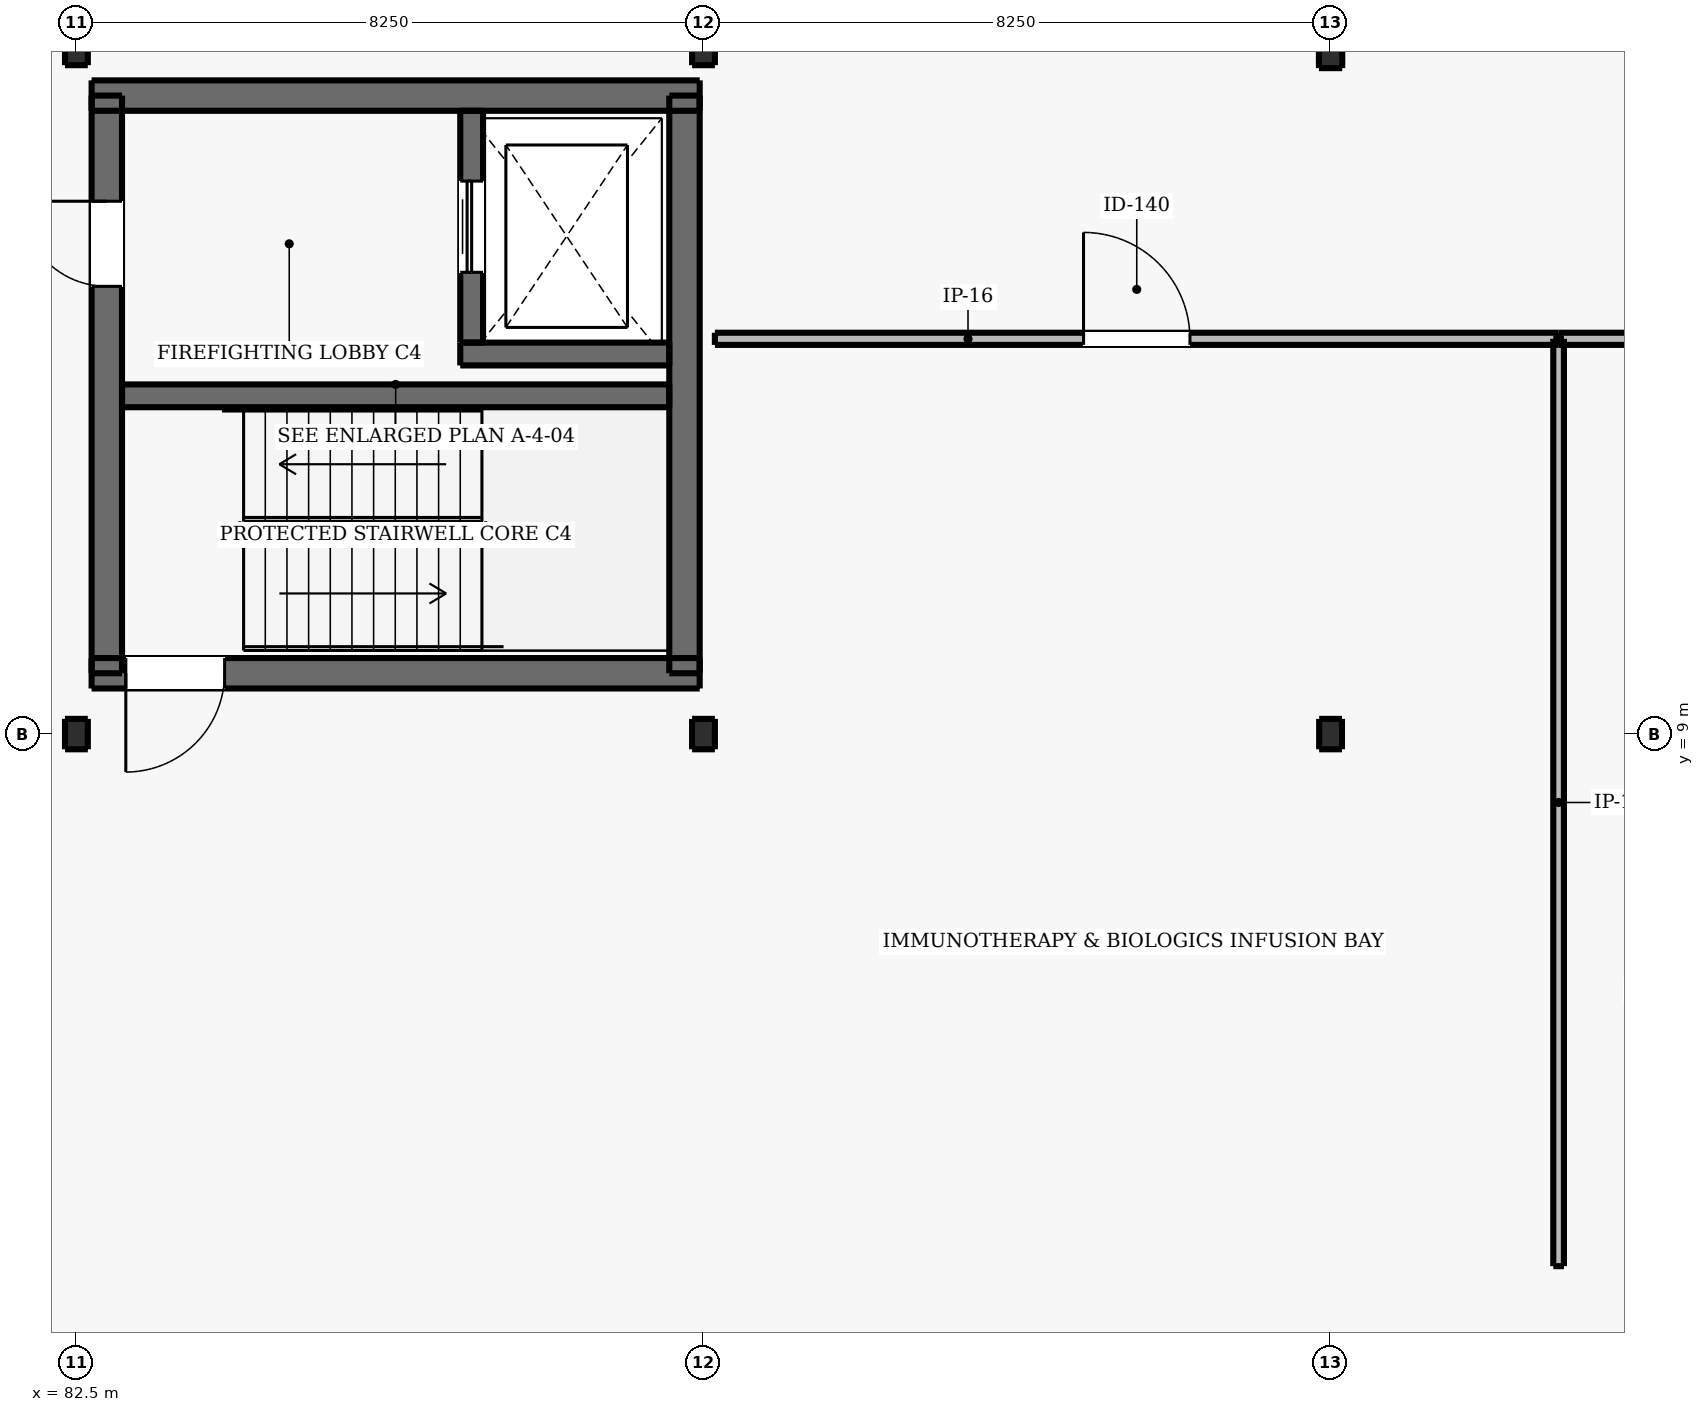
"""IFC4 building model, lengths in metres.
Left out: names, types, materials, properties, quantities, classifications, styles, units other than length and angle.
Written with IfcOpenShell. Run it as: python <this file> out.ifc"""

import sys

from ifc_helpers import new_model, si_unit, direction, frame, frame_2d, origin, origin_2d, place, context, subcontext, project, spatial, rectangle, i_section, extrude, element, fill, save


model = new_model("IFC4")
c1 = context("Model", 3, precision=1e-05, world=origin(), true_north=direction((0.0, 1.0)))
c2 = subcontext(c1, "Body", "Model", "MODEL_VIEW")
j1 = project(units=[si_unit("LENGTHUNIT", "METRE"), si_unit("PLANEANGLEUNIT", "RADIAN")], contexts=[c1])
p1 = place(None, origin())
s1 = spatial("IfcSite", under=j1, at=p1, CompositionType="ELEMENT")
p2 = place(p1, origin())
s2 = spatial("IfcBuilding", under=s1, at=p2, CompositionType="ELEMENT")
p3 = place(p2, frame((0.0, 0.0, 9.6)))
s3 = spatial("IfcBuildingStorey", under=s2, at=p3, CompositionType="ELEMENT", Elevation=9.6)
for number, where, z_axis, x_axis in (
    (1, (82.5, 9.0, 0.0), (0.0, 0.0, 1.0), (1.0, 0.0, 0.0)),
    (2, (82.5, 18.0, 0.0), (0.0, 0.0, 1.0), (1.0, 0.0, 0.0)),
    (3, (90.75, 9.0, 0.0), (0.0, 0.0, 1.0), (1.0, 0.0, 0.0)),
    (4, (90.75, 18.0, 0.0), (0.0, 0.0, 1.0), (1.0, 0.0, 0.0)),
    (5, (99.0, 9.0, 0.0), (0.0, 0.0, 1.0), (1.0, 0.0, 0.0)),
):
    element("IfcColumn", number, at=place(p3, frame(where, z_axis=z_axis, x_axis=x_axis)), inside=s3, PredefinedType="COLUMN", context=c2, shape_type="SweptSolid", body=[
        extrude(i_section(OverallWidth=0.3, OverallDepth=0.4, WebThickness=0.013, FlangeThickness=0.024, FilletRadius=0.027, at=origin_2d()), origin(), (0.0, 0.0, 1.0), 4.2),
    ])
p4 = place(p3, frame((99.0, 18.0, 0.0), z_axis=(0.0, 0.0, 1.0), x_axis=(1.0, 0.0, 0.0)))
e6 = element("IfcColumn", 6, at=p4, inside=s3, PredefinedType="COLUMN", context=c2, shape_type="SweptSolid", body=[
    extrude(i_section(OverallWidth=0.307, OverallDepth=0.478, WebThickness=0.021, FlangeThickness=0.04, FilletRadius=0.027, at=origin_2d()), origin(), (0.0, 0.0, 1.0), 4.2),
])
p5 = place(p3, frame((82.7, 9.8, 0.0), z_axis=(0.0, 0.0, 1.0), x_axis=(1.0, 0.0, 0.0)))
e7 = element("IfcWall", 7, at=p5, inside=s3, PredefinedType="SHEAR", context=c2, shape_type="SweptSolid", body=[
    extrude(rectangle(XDim=8.0, YDim=0.4, at=frame_2d((4.0, 0.0))), origin(), (0.0, 0.0, 1.0), 4.2),
])
p6 = place(p5, frame((0.45, 0.0, 0.0)))
e8 = element("IfcOpeningElement", 8, at=p6, cuts=e7, PredefinedType="OPENING", context=c2, shape_type="SweptSolid", body=[
    extrude(rectangle(XDim=1.3, YDim=2.15, at=frame_2d((0.65, 1.075))), frame((0.0, 0.21, 0.0), z_axis=(0.0, -1.0, 0.0), x_axis=(1.0, 0.0, 0.0)), (0.0, 0.0, 1.0), 0.42),
])
p7 = place(p3, frame((82.7, 17.4, 0.0), z_axis=(0.0, 0.0, 1.0), x_axis=(1.0, 0.0, 0.0)))
e9 = element("IfcWall", 9, at=p7, inside=s3, PredefinedType="SHEAR", context=c2, shape_type="SweptSolid", body=[
    extrude(rectangle(XDim=8.0, YDim=0.4, at=frame_2d((4.0, 0.0))), origin(), (0.0, 0.0, 1.0), 4.2),
])
p8 = place(p3, frame((82.9, 9.8, 0.0), z_axis=(0.0, 0.0, 1.0), x_axis=(0.0, 1.0, 0.0)))
e10 = element("IfcWall", 10, at=p8, inside=s3, PredefinedType="SHEAR", context=c2, shape_type="SweptSolid", body=[
    extrude(rectangle(XDim=7.6, YDim=0.4, at=frame_2d((3.8, 0.0))), origin(), (0.0, 0.0, 1.0), 4.2),
])
p9 = place(p8, frame((5.09, 0.0, 0.0)))
e11 = element("IfcOpeningElement", 11, at=p9, cuts=e10, PredefinedType="OPENING", context=c2, shape_type="SweptSolid", body=[
    extrude(rectangle(XDim=1.12, YDim=2.15, at=frame_2d((0.56, 1.075))), frame((0.0, 0.21, 0.0), z_axis=(0.0, -1.0, 0.0), x_axis=(1.0, 0.0, 0.0)), (0.0, 0.0, 1.0), 0.42),
])
p10 = place(p3, frame((90.5, 9.8, 0.0), z_axis=(0.0, 0.0, 1.0), x_axis=(0.0, 1.0, 0.0)))
e12 = element("IfcWall", 12, at=p10, inside=s3, PredefinedType="SHEAR", context=c2, shape_type="SweptSolid", body=[
    extrude(rectangle(XDim=7.6, YDim=0.4, at=frame_2d((3.8, 0.0))), origin(), (0.0, 0.0, 1.0), 4.2),
])
p11 = place(p3, frame((83.1, 13.45, 0.0), z_axis=(0.0, 0.0, 1.0), x_axis=(1.0, 0.0, 0.0)))
e13 = element("IfcWall", 13, at=p11, inside=s3, PredefinedType="SHEAR", context=c2, shape_type="SweptSolid", body=[
    extrude(rectangle(XDim=7.2, YDim=0.3, at=frame_2d((3.6, 0.0))), origin(), (0.0, 0.0, 1.0), 4.2),
])
p12 = place(p3, frame((87.55, 14.0, 0.0), z_axis=(0.0, 0.0, 1.0), x_axis=(1.0, 0.0, 0.0)))
e14 = element("IfcWall", 14, at=p12, inside=s3, PredefinedType="SHEAR", context=c2, shape_type="SweptSolid", body=[
    extrude(rectangle(XDim=2.75, YDim=0.3, at=frame_2d((1.375, 0.0))), origin(), (0.0, 0.0, 1.0), 4.2),
])
p13 = place(p3, frame((87.7, 14.15, 0.0), z_axis=(0.0, 0.0, 1.0), x_axis=(0.0, 1.0, 0.0)))
e15 = element("IfcWall", 15, at=p13, inside=s3, PredefinedType="SHEAR", context=c2, shape_type="SweptSolid", body=[
    extrude(rectangle(XDim=3.05, YDim=0.3, at=frame_2d((1.525, 0.0))), origin(), (0.0, 0.0, 1.0), 4.2),
])
p14 = place(p13, frame((0.925, 0.0, 0.0)))
e16 = element("IfcOpeningElement", 16, at=p14, cuts=e15, PredefinedType="OPENING", context=c2, shape_type="SweptSolid", body=[
    extrude(rectangle(XDim=1.2, YDim=2.15, at=frame_2d((0.6, 1.075))), frame((0.0, 0.16, 0.0), z_axis=(0.0, -1.0, 0.0), x_axis=(1.0, 0.0, 0.0)), (0.0, 0.0, 1.0), 0.32),
])
p15 = place(p3, frame((90.9, 14.2, 0.0), z_axis=(0.0, 0.0, 1.0), x_axis=(1.0, 0.0, 0.0)))
e17 = element("IfcWall", 17, at=p15, inside=s3, PredefinedType="PARTITIONING", context=c2, shape_type="SweptSolid", body=[
    extrude(rectangle(XDim=11.1, YDim=0.16, at=frame_2d((5.55, 0.0))), origin(), (0.0, 0.0, 1.0), 3.93),
])
p16 = place(p15, frame((4.85, 0.0, 0.0)))
e18 = element("IfcOpeningElement", 18, at=p16, cuts=e17, PredefinedType="OPENING", context=c2, shape_type="SweptSolid", body=[
    extrude(rectangle(XDim=1.4, YDim=2.2, at=frame_2d((0.7, 1.1))), frame((0.0, 0.09, 0.0), z_axis=(0.0, -1.0, 0.0), x_axis=(1.0, 0.0, 0.0)), (0.0, 0.0, 1.0), 0.18),
])
p17 = place(p3, frame((102.0, 2.0, 0.0), z_axis=(0.0, 0.0, 1.0), x_axis=(0.0, 1.0, 0.0)))
e19 = element("IfcWall", 19, at=p17, inside=s3, PredefinedType="PARTITIONING", context=c2, shape_type="SweptSolid", body=[
    extrude(rectangle(XDim=12.2, YDim=0.14, at=frame_2d((6.1, 0.0))), origin(), (0.0, 0.0, 1.0), 3.93),
])
p18 = place(p3, frame((102.0, 14.2, 0.0), z_axis=(0.0, 0.0, 1.0), x_axis=(1.0, 0.0, 0.0)))
e20 = element("IfcWall", 20, at=p18, inside=s3, PredefinedType="PARTITIONING", context=c2, shape_type="SweptSolid", body=[
    extrude(rectangle(XDim=8.0, YDim=0.16, at=frame_2d((4.0, 0.0))), origin(), (0.0, 0.0, 1.0), 3.93),
])
p19 = place(p18, frame((3.4, 0.0, 0.0)))
e21 = element("IfcOpeningElement", 21, at=p19, cuts=e20, PredefinedType="OPENING", context=c2, shape_type="SweptSolid", body=[
    extrude(rectangle(XDim=1.2, YDim=2.2, at=frame_2d((0.6, 1.1))), frame((0.0, 0.09, 0.0), z_axis=(0.0, -1.0, 0.0), x_axis=(1.0, 0.0, 0.0)), (0.0, 0.0, 1.0), 0.18),
])
p20 = place(p14, origin())
e22 = element("IfcDoor", 22, at=p20, inside=s3, OperationType="DOUBLE_DOOR_SLIDING", PredefinedType="DOOR", context=c2, shape_type="SweptSolid", body=[
    extrude(rectangle(XDim=1.2, YDim=2.15, at=frame_2d((0.6, 1.075))), frame((0.0, 0.025, 0.0), z_axis=(0.0, -1.0, 0.0), x_axis=(1.0, 0.0, 0.0)), (0.0, 0.0, 1.0), 0.05),
])
fill(e16, e22)
p21 = place(p9, origin())
e23 = element("IfcDoor", 23, at=p21, inside=s3, OperationType="SINGLE_SWING_RIGHT", PredefinedType="DOOR", context=c2, shape_type="SweptSolid", body=[
    extrude(rectangle(XDim=1.12, YDim=2.15, at=frame_2d((0.56, 1.075))), frame((0.0, 0.025, 0.0), z_axis=(0.0, -1.0, 0.0), x_axis=(1.0, 0.0, 0.0)), (0.0, 0.0, 1.0), 0.05),
])
fill(e11, e23)
p22 = place(p6, frame((1.3, 0.0, 0.0), z_axis=(0.0, 0.0, 1.0), x_axis=(-1.0, 0.0, 0.0)))
e24 = element("IfcDoor", 24, at=p22, inside=s3, OperationType="SINGLE_SWING_LEFT", PredefinedType="DOOR", context=c2, shape_type="SweptSolid", body=[
    extrude(rectangle(XDim=1.3, YDim=2.15, at=frame_2d((0.65, 1.075))), frame((0.0, 0.025, 0.0), z_axis=(0.0, -1.0, 0.0), x_axis=(1.0, 0.0, 0.0)), (0.0, 0.0, 1.0), 0.05),
])
fill(e8, e24)
p23 = place(p16, origin())
e25 = element("IfcDoor", 25, at=p23, inside=s3, OperationType="SINGLE_SWING_LEFT", PredefinedType="DOOR", context=c2, shape_type="SweptSolid", body=[
    extrude(rectangle(XDim=1.4, YDim=2.2, at=frame_2d((0.7, 1.1))), frame((0.0, 0.025, 0.0), z_axis=(0.0, -1.0, 0.0), x_axis=(1.0, 0.0, 0.0)), (0.0, 0.0, 1.0), 0.05),
])
fill(e18, e25)
save(model, sys.argv[1])
